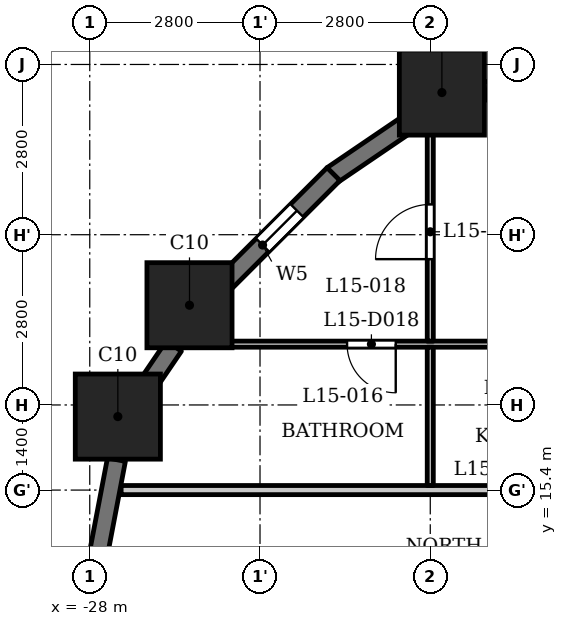
"""IFC4 building model, lengths in metres.
Left out: names, types, materials, properties, quantities, classifications, styles, units other than length and angle.
Written with IfcOpenShell. Run it as: python <this file> out.ifc"""

import sys

from ifc_helpers import new_model, si_unit, direction, frame, frame_2d, origin, origin_2d, place, context, subcontext, project, spatial, rectangle, extrude, element, fill, save


model = new_model("IFC4")
c1 = context("Model", 3, precision=1e-05, world=origin(), true_north=direction((0.0, 1.0)))
c2 = subcontext(c1, "Body", "Model", "MODEL_VIEW")
j1 = project(units=[si_unit("LENGTHUNIT", "METRE"), si_unit("PLANEANGLEUNIT", "RADIAN")], contexts=[c1])
p1 = place(None, origin())
s1 = spatial("IfcSite", under=j1, at=p1, CompositionType="ELEMENT")
p2 = place(p1, origin())
s2 = spatial("IfcBuilding", under=s1, at=p2, CompositionType="ELEMENT")
p3 = place(p2, frame((0.0, 0.0, 62.0)))
s3 = spatial("IfcBuildingStorey", under=s2, at=p3, CompositionType="ELEMENT", Elevation=62.0)
for number, where, z_axis, x_axis in (
    (1, (-22.209, 21.938, 0.0), (0.0, 0.0, 1.0), (1.0, 0.0, 0.0)),
    (2, (-26.36, 18.44, 0.0), (0.0, 0.0, 1.0), (1.0, 0.0, 0.0)),
    (3, (-27.538, 16.609, 0.0), (0.0, 0.0, 1.0), (1.0, 0.0, 0.0)),
):
    element("IfcColumn", number, at=place(p3, frame(where, z_axis=z_axis, x_axis=x_axis)), inside=s3, PredefinedType="COLUMN", context=c2, shape_type="SweptSolid", body=[
        extrude(rectangle(XDim=1.4, YDim=1.4, at=origin_2d()), origin(), (0.0, 0.0, 1.0), 3.5),
    ])
p4 = place(p3, frame((-19.972, 22.253, 0.0), z_axis=(0.0, 0.0, 1.0), x_axis=(-0.982297345734, -0.187328386968, 0.0)))
e4 = element("IfcWall", 4, at=p4, inside=s3, PredefinedType="SOLIDWALL", context=c2, shape_type="SweptSolid", body=[
    extrude(rectangle(XDim=1.556, YDim=0.3, at=frame_2d((0.778, 0.0))), origin(), (0.0, 0.0, 1.0), 2.35),
])
p5 = place(p3, frame((-22.726, 21.454, 0.0), z_axis=(0.0, 0.0, 1.0), x_axis=(-0.827019875346, -0.562172683241, 0.0)))
e5 = element("IfcWall", 5, at=p5, inside=s3, PredefinedType="SOLIDWALL", context=c2, shape_type="SweptSolid", body=[
    extrude(rectangle(XDim=1.556, YDim=0.3, at=frame_2d((0.778, 0.0))), origin(), (0.0, 0.0, 1.0), 2.35),
])
p6 = place(p3, frame((-23.991, 20.597, 0.0), z_axis=(0.0, 0.0, 1.0), x_axis=(-0.707106781187, -0.707106781187, 0.0)))
e6 = element("IfcWall", 6, at=p6, inside=s3, PredefinedType="SOLIDWALL", context=c2, shape_type="SweptSolid", body=[
    extrude(rectangle(XDim=2.5, YDim=0.3, at=frame_2d((1.25, 0.0))), origin(), (0.0, 0.0, 1.0), 2.35),
])
p7 = place(p6, frame((0.85, 0.0, 0.6)))
e7 = element("IfcOpeningElement", 7, at=p7, cuts=e6, PredefinedType="OPENING", context=c2, shape_type="SweptSolid", body=[
    extrude(rectangle(XDim=0.8, YDim=1.55, at=frame_2d((0.4, 0.775))), frame((0.0, 0.16, 0.0), z_axis=(0.0, -1.0, 0.0), x_axis=(1.0, 0.0, 0.0)), (0.0, 0.0, 1.0), 0.32),
])
p8 = place(p3, frame((-26.617, 17.769, 0.0), z_axis=(0.0, 0.0, 1.0), x_axis=(-0.562000651531, -0.827136788977, 0.0)))
e8 = element("IfcWall", 8, at=p8, inside=s3, PredefinedType="SOLIDWALL", context=c2, shape_type="SweptSolid", body=[
    extrude(rectangle(XDim=0.777, YDim=0.3, at=frame_2d((0.389, 0.0))), origin(), (0.0, 0.0, 1.0), 3.2),
])
p9 = place(p3, frame((-27.561, 15.9, 0.0), z_axis=(0.0, 0.0, 1.0), x_axis=(-0.187328386968, -0.982297345734, 0.0)))
e9 = element("IfcWall", 9, at=p9, inside=s3, PredefinedType="SOLIDWALL", context=c2, shape_type="SweptSolid", body=[
    extrude(rectangle(XDim=1.556, YDim=0.3, at=frame_2d((0.778, 0.0))), origin(), (0.0, 0.0, 1.0), 2.35),
])
p10 = place(p3, frame((-27.484, 15.4, 0.0), z_axis=(0.0, 0.0, 1.0), x_axis=(1.0, 0.0, 0.0)))
e10 = element("IfcWall", 10, at=p10, inside=s3, PredefinedType="PARTITIONING", context=c2, shape_type="SweptSolid", body=[
    extrude(rectangle(XDim=54.968, YDim=0.15, at=frame_2d((27.484, 0.0))), origin(), (0.0, 0.0, 1.0), 3.2),
])
p11 = place(p10, frame((8.784, 0.0, 0.0)))
e11 = element("IfcOpeningElement", 11, at=p11, cuts=e10, PredefinedType="OPENING", context=c2, shape_type="SweptSolid", body=[
    extrude(rectangle(XDim=1.0, YDim=2.1, at=frame_2d((0.5, 1.05))), frame((0.0, 0.085, 0.0), z_axis=(0.0, -1.0, 0.0), x_axis=(1.0, 0.0, 0.0)), (0.0, 0.0, 1.0), 0.17),
])
p12 = place(p10, frame((14.634, 0.0, 0.0)))
e12 = element("IfcOpeningElement", 12, at=p12, cuts=e10, PredefinedType="OPENING", context=c2, shape_type="SweptSolid", body=[
    extrude(rectangle(XDim=1.0, YDim=2.1, at=frame_2d((0.5, 1.05))), frame((0.0, 0.085, 0.0), z_axis=(0.0, -1.0, 0.0), x_axis=(1.0, 0.0, 0.0)), (0.0, 0.0, 1.0), 0.17),
])
p13 = place(p10, frame((19.484, 0.0, 0.0)))
e13 = element("IfcOpeningElement", 13, at=p13, cuts=e10, PredefinedType="OPENING", context=c2, shape_type="SweptSolid", body=[
    extrude(rectangle(XDim=1.0, YDim=2.1, at=frame_2d((0.5, 1.05))), frame((0.0, 0.085, 0.0), z_axis=(0.0, -1.0, 0.0), x_axis=(1.0, 0.0, 0.0)), (0.0, 0.0, 1.0), 0.17),
])
p14 = place(p10, frame((23.634, 0.0, 0.0)))
e14 = element("IfcOpeningElement", 14, at=p14, cuts=e10, PredefinedType="OPENING", context=c2, shape_type="SweptSolid", body=[
    extrude(rectangle(XDim=1.0, YDim=2.1, at=frame_2d((0.5, 1.05))), frame((0.0, 0.085, 0.0), z_axis=(0.0, -1.0, 0.0), x_axis=(1.0, 0.0, 0.0)), (0.0, 0.0, 1.0), 0.17),
])
p15 = place(p10, frame((28.234, 0.0, 0.0)))
e15 = element("IfcOpeningElement", 15, at=p15, cuts=e10, PredefinedType="OPENING", context=c2, shape_type="SweptSolid", body=[
    extrude(rectangle(XDim=1.0, YDim=2.1, at=frame_2d((0.5, 1.05))), frame((0.0, 0.085, 0.0), z_axis=(0.0, -1.0, 0.0), x_axis=(1.0, 0.0, 0.0)), (0.0, 0.0, 1.0), 0.17),
])
p16 = place(p10, frame((33.784, 0.0, 0.0)))
e16 = element("IfcOpeningElement", 16, at=p16, cuts=e10, PredefinedType="OPENING", context=c2, shape_type="SweptSolid", body=[
    extrude(rectangle(XDim=1.0, YDim=2.1, at=frame_2d((0.5, 1.05))), frame((0.0, 0.085, 0.0), z_axis=(0.0, -1.0, 0.0), x_axis=(1.0, 0.0, 0.0)), (0.0, 0.0, 1.0), 0.17),
])
p17 = place(p10, frame((39.534, 0.0, 0.0)))
e17 = element("IfcOpeningElement", 17, at=p17, cuts=e10, PredefinedType="OPENING", context=c2, shape_type="SweptSolid", body=[
    extrude(rectangle(XDim=1.0, YDim=2.1, at=frame_2d((0.5, 1.05))), frame((0.0, 0.085, 0.0), z_axis=(0.0, -1.0, 0.0), x_axis=(1.0, 0.0, 0.0)), (0.0, 0.0, 1.0), 0.17),
])
p18 = place(p10, frame((48.234, 0.0, 0.0)))
e18 = element("IfcOpeningElement", 18, at=p18, cuts=e10, PredefinedType="OPENING", context=c2, shape_type="SweptSolid", body=[
    extrude(rectangle(XDim=1.0, YDim=2.1, at=frame_2d((0.5, 1.05))), frame((0.0, 0.085, 0.0), z_axis=(0.0, -1.0, 0.0), x_axis=(1.0, 0.0, 0.0)), (0.0, 0.0, 1.0), 0.17),
])
p19 = place(p3, frame((-26.64, 17.8, 0.0), z_axis=(0.0, 0.0, 1.0), x_axis=(1.0, 0.0, 0.0)))
e19 = element("IfcWall", 19, at=p19, inside=s3, PredefinedType="PARTITIONING", context=c2, shape_type="SweptSolid", body=[
    extrude(rectangle(XDim=53.034, YDim=0.1, at=frame_2d((26.517, 0.0))), origin(), (0.0, 0.0, 1.0), 3.2),
])
p20 = place(p19, frame((2.872, 0.0, 0.0)))
e20 = element("IfcOpeningElement", 20, at=p20, cuts=e19, PredefinedType="OPENING", context=c2, shape_type="SweptSolid", body=[
    extrude(rectangle(XDim=0.8, YDim=2.1, at=frame_2d((0.4, 1.05))), frame((0.0, 0.06, 0.0), z_axis=(0.0, -1.0, 0.0), x_axis=(1.0, 0.0, 0.0)), (0.0, 0.0, 1.0), 0.12),
])
p21 = place(p19, frame((7.04, 0.0, 0.0)))
e21 = element("IfcOpeningElement", 21, at=p21, cuts=e19, PredefinedType="OPENING", context=c2, shape_type="SweptSolid", body=[
    extrude(rectangle(XDim=0.9, YDim=2.1, at=frame_2d((0.45, 1.05))), frame((0.0, 0.06, 0.0), z_axis=(0.0, -1.0, 0.0), x_axis=(1.0, 0.0, 0.0)), (0.0, 0.0, 1.0), 0.12),
])
p22 = place(p19, frame((10.74, 0.0, 0.0)))
e22 = element("IfcOpeningElement", 22, at=p22, cuts=e19, PredefinedType="OPENING", context=c2, shape_type="SweptSolid", body=[
    extrude(rectangle(XDim=0.8, YDim=2.1, at=frame_2d((0.4, 1.05))), frame((0.0, 0.06, 0.0), z_axis=(0.0, -1.0, 0.0), x_axis=(1.0, 0.0, 0.0)), (0.0, 0.0, 1.0), 0.12),
])
p23 = place(p19, frame((12.89, 0.0, 0.0)))
e23 = element("IfcOpeningElement", 23, at=p23, cuts=e19, PredefinedType="OPENING", context=c2, shape_type="SweptSolid", body=[
    extrude(rectangle(XDim=0.9, YDim=2.1, at=frame_2d((0.45, 1.05))), frame((0.0, 0.06, 0.0), z_axis=(0.0, -1.0, 0.0), x_axis=(1.0, 0.0, 0.0)), (0.0, 0.0, 1.0), 0.12),
])
p24 = place(p19, frame((16.34, 0.0, 0.0)))
e24 = element("IfcOpeningElement", 24, at=p24, cuts=e19, PredefinedType="OPENING", context=c2, shape_type="SweptSolid", body=[
    extrude(rectangle(XDim=0.8, YDim=2.1, at=frame_2d((0.4, 1.05))), frame((0.0, 0.06, 0.0), z_axis=(0.0, -1.0, 0.0), x_axis=(1.0, 0.0, 0.0)), (0.0, 0.0, 1.0), 0.12),
])
p25 = place(p19, frame((19.74, 0.0, 0.0)))
e25 = element("IfcOpeningElement", 25, at=p25, cuts=e19, PredefinedType="OPENING", context=c2, shape_type="SweptSolid", body=[
    extrude(rectangle(XDim=0.9, YDim=2.1, at=frame_2d((0.45, 1.05))), frame((0.0, 0.06, 0.0), z_axis=(0.0, -1.0, 0.0), x_axis=(1.0, 0.0, 0.0)), (0.0, 0.0, 1.0), 0.12),
])
p26 = place(p19, frame((25.09, 0.0, 0.0)))
e26 = element("IfcOpeningElement", 26, at=p26, cuts=e19, PredefinedType="OPENING", context=c2, shape_type="SweptSolid", body=[
    extrude(rectangle(XDim=0.8, YDim=2.1, at=frame_2d((0.4, 1.05))), frame((0.0, 0.06, 0.0), z_axis=(0.0, -1.0, 0.0), x_axis=(1.0, 0.0, 0.0)), (0.0, 0.0, 1.0), 0.12),
])
p27 = place(p19, frame((21.89, 0.0, 0.0)))
e27 = element("IfcOpeningElement", 27, at=p27, cuts=e19, PredefinedType="OPENING", context=c2, shape_type="SweptSolid", body=[
    extrude(rectangle(XDim=0.9, YDim=2.1, at=frame_2d((0.45, 1.05))), frame((0.0, 0.06, 0.0), z_axis=(0.0, -1.0, 0.0), x_axis=(1.0, 0.0, 0.0)), (0.0, 0.0, 1.0), 0.12),
])
p28 = place(p19, frame((30.69, 0.0, 0.0)))
e28 = element("IfcOpeningElement", 28, at=p28, cuts=e19, PredefinedType="OPENING", context=c2, shape_type="SweptSolid", body=[
    extrude(rectangle(XDim=0.8, YDim=2.1, at=frame_2d((0.4, 1.05))), frame((0.0, 0.06, 0.0), z_axis=(0.0, -1.0, 0.0), x_axis=(1.0, 0.0, 0.0)), (0.0, 0.0, 1.0), 0.12),
])
p29 = place(p19, frame((28.49, 0.0, 0.0)))
e29 = element("IfcOpeningElement", 29, at=p29, cuts=e19, PredefinedType="OPENING", context=c2, shape_type="SweptSolid", body=[
    extrude(rectangle(XDim=0.9, YDim=2.1, at=frame_2d((0.45, 1.05))), frame((0.0, 0.06, 0.0), z_axis=(0.0, -1.0, 0.0), x_axis=(1.0, 0.0, 0.0)), (0.0, 0.0, 1.0), 0.12),
])
p30 = place(p19, frame((36.49, 0.0, 0.0)))
e30 = element("IfcOpeningElement", 30, at=p30, cuts=e19, PredefinedType="OPENING", context=c2, shape_type="SweptSolid", body=[
    extrude(rectangle(XDim=0.8, YDim=2.1, at=frame_2d((0.4, 1.05))), frame((0.0, 0.06, 0.0), z_axis=(0.0, -1.0, 0.0), x_axis=(1.0, 0.0, 0.0)), (0.0, 0.0, 1.0), 0.12),
])
p31 = place(p19, frame((33.04, 0.0, 0.0)))
e31 = element("IfcOpeningElement", 31, at=p31, cuts=e19, PredefinedType="OPENING", context=c2, shape_type="SweptSolid", body=[
    extrude(rectangle(XDim=0.9, YDim=2.1, at=frame_2d((0.45, 1.05))), frame((0.0, 0.06, 0.0), z_axis=(0.0, -1.0, 0.0), x_axis=(1.0, 0.0, 0.0)), (0.0, 0.0, 1.0), 0.12),
])
p32 = place(p19, frame((41.49, 0.0, 0.0)))
e32 = element("IfcOpeningElement", 32, at=p32, cuts=e19, PredefinedType="OPENING", context=c2, shape_type="SweptSolid", body=[
    extrude(rectangle(XDim=0.8, YDim=2.1, at=frame_2d((0.4, 1.05))), frame((0.0, 0.06, 0.0), z_axis=(0.0, -1.0, 0.0), x_axis=(1.0, 0.0, 0.0)), (0.0, 0.0, 1.0), 0.12),
])
p33 = place(p19, frame((39.79, 0.0, 0.0)))
e33 = element("IfcOpeningElement", 33, at=p33, cuts=e19, PredefinedType="OPENING", context=c2, shape_type="SweptSolid", body=[
    extrude(rectangle(XDim=0.9, YDim=2.1, at=frame_2d((0.45, 1.05))), frame((0.0, 0.06, 0.0), z_axis=(0.0, -1.0, 0.0), x_axis=(1.0, 0.0, 0.0)), (0.0, 0.0, 1.0), 0.12),
])
p34 = place(p19, frame((51.44, 0.0, 0.0)))
e34 = element("IfcOpeningElement", 34, at=p34, cuts=e19, PredefinedType="OPENING", context=c2, shape_type="SweptSolid", body=[
    extrude(rectangle(XDim=0.8, YDim=2.1, at=frame_2d((0.4, 1.05))), frame((0.0, 0.06, 0.0), z_axis=(0.0, -1.0, 0.0), x_axis=(1.0, 0.0, 0.0)), (0.0, 0.0, 1.0), 0.12),
])
p35 = place(p19, frame((46.49, 0.0, 0.0)))
e35 = element("IfcOpeningElement", 35, at=p35, cuts=e19, PredefinedType="OPENING", context=c2, shape_type="SweptSolid", body=[
    extrude(rectangle(XDim=0.9, YDim=2.1, at=frame_2d((0.45, 1.05))), frame((0.0, 0.06, 0.0), z_axis=(0.0, -1.0, 0.0), x_axis=(1.0, 0.0, 0.0)), (0.0, 0.0, 1.0), 0.12),
])
p36 = place(p3, frame((-22.4, 15.475, 0.0), z_axis=(0.0, 0.0, 1.0), x_axis=(0.0, 1.0, 0.0)))
e36 = element("IfcWall", 36, at=p36, inside=s3, PredefinedType="PARTITIONING", context=c2, shape_type="SweptSolid", body=[
    extrude(rectangle(XDim=2.275, YDim=0.1, at=frame_2d((1.137, 0.0))), origin(), (0.0, 0.0, 1.0), 3.2),
])
p37 = place(p3, frame((-22.4, 17.85, 0.0), z_axis=(0.0, 0.0, 1.0), x_axis=(0.0, 1.0, 0.0)))
e37 = element("IfcWall", 37, at=p37, inside=s3, PredefinedType="PARTITIONING", context=c2, shape_type="SweptSolid", body=[
    extrude(rectangle(XDim=3.87, YDim=0.1, at=frame_2d((1.935, 0.0))), origin(), (0.0, 0.0, 1.0), 3.2),
])
p38 = place(p37, frame((1.348, 0.0, 0.0)))
e38 = element("IfcOpeningElement", 38, at=p38, cuts=e37, PredefinedType="OPENING", context=c2, shape_type="SweptSolid", body=[
    extrude(rectangle(XDim=0.9, YDim=2.1, at=frame_2d((0.45, 1.05))), frame((0.0, 0.06, 0.0), z_axis=(0.0, -1.0, 0.0), x_axis=(1.0, 0.0, 0.0)), (0.0, 0.0, 1.0), 0.12),
])
p39 = place(p20, origin())
e39 = element("IfcDoor", 39, at=p39, inside=s3, OperationType="SINGLE_SWING_RIGHT", PredefinedType="DOOR", context=c2, shape_type="SweptSolid", body=[
    extrude(rectangle(XDim=0.8, YDim=2.1, at=frame_2d((0.4, 1.05))), frame((0.0, 0.025, 0.0), z_axis=(0.0, -1.0, 0.0), x_axis=(1.0, 0.0, 0.0)), (0.0, 0.0, 1.0), 0.05),
])
fill(e20, e39)
p40 = place(p38, origin())
e40 = element("IfcDoor", 40, at=p40, inside=s3, OperationType="SINGLE_SWING_RIGHT", PredefinedType="DOOR", context=c2, shape_type="SweptSolid", body=[
    extrude(rectangle(XDim=0.9, YDim=2.1, at=frame_2d((0.45, 1.05))), frame((0.0, 0.025, 0.0), z_axis=(0.0, -1.0, 0.0), x_axis=(1.0, 0.0, 0.0)), (0.0, 0.0, 1.0), 0.05),
])
fill(e38, e40)
p41 = place(p7, origin())
e41 = element("IfcWindow", 41, at=p41, inside=s3, PartitioningType="SINGLE_PANEL", PredefinedType="WINDOW", context=c2, shape_type="SweptSolid", body=[
    extrude(rectangle(XDim=0.8, YDim=1.55, at=frame_2d((0.4, 0.775))), frame((0.0, 0.03, 0.0), z_axis=(0.0, -1.0, 0.0), x_axis=(1.0, 0.0, 0.0)), (0.0, 0.0, 1.0), 0.06),
])
fill(e7, e41)
save(model, sys.argv[1])
